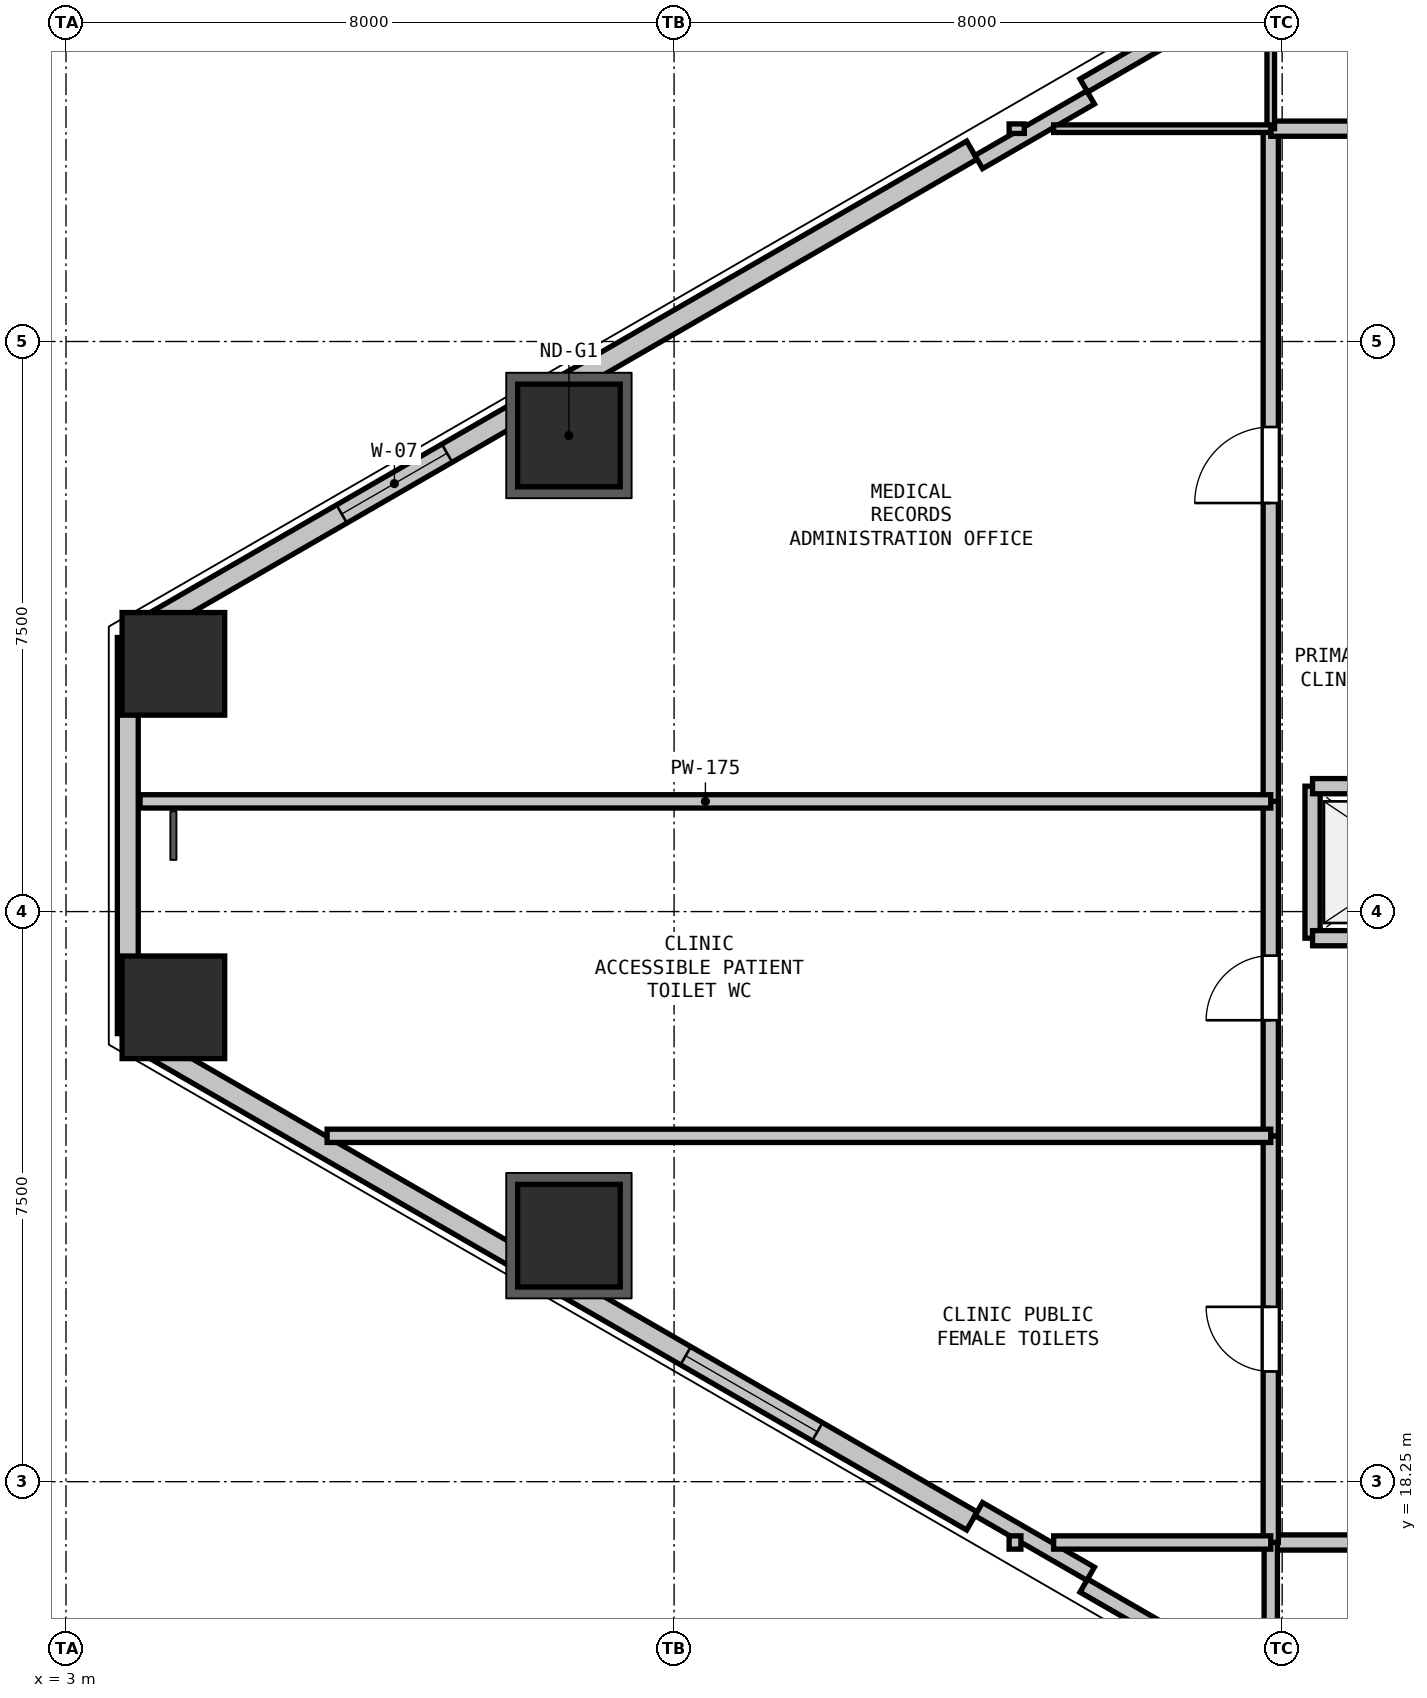
"""IFC4 building model, lengths in metres.
Left out: names, types, materials, properties, quantities, classifications, styles, units other than length and angle.
Written with IfcOpenShell. Run it as: python <this file> out.ifc"""

import sys

from ifc_helpers import new_model, si_unit, direction, frame, frame_2d, origin, origin_2d, place, context, subcontext, project, spatial, rectangle, hollow_rectangle, extrude, element, fill, save


model = new_model("IFC4")
c1 = context("Model", 3, precision=1e-05, world=origin(), true_north=direction((0.0, 1.0)))
c2 = subcontext(c1, "Body", "Model", "MODEL_VIEW")
j1 = project(units=[si_unit("LENGTHUNIT", "METRE"), si_unit("PLANEANGLEUNIT", "RADIAN")], contexts=[c1])
p1 = place(None, origin())
s1 = spatial("IfcSite", under=j1, at=p1, CompositionType="ELEMENT")
p2 = place(p1, origin())
s2 = spatial("IfcBuilding", under=s1, at=p2, CompositionType="ELEMENT")
p3 = place(p2, frame((0.0, 0.0, 9.6)))
s3 = spatial("IfcBuildingStorey", under=s2, at=p3, CompositionType="ELEMENT", Elevation=9.6)
for number, where, z_axis, x_axis in (
    (1, (4.413, 29.009, -0.32), (0.0, 0.0, 1.0), (1.0, 0.0, 0.0)),
    (2, (9.617, 32.014, -0.32), (0.0, 0.0, 1.0), (1.0, 0.0, 0.0)),
    (3, (9.617, 21.486, -0.32), (0.0, 0.0, 1.0), (1.0, 0.0, 0.0)),
    (4, (4.413, 24.491, -0.32), (0.0, 0.0, 1.0), (1.0, 0.0, 0.0)),
):
    element("IfcColumn", number, at=place(p3, frame(where, z_axis=z_axis, x_axis=x_axis)), inside=s3, PredefinedType="COLUMN", context=c2, shape_type="SweptSolid", body=[
        extrude(hollow_rectangle(XDim=1.35, YDim=1.35, WallThickness=0.036, at=origin_2d()), origin(), (0.0, 0.0, 1.0), 5.12),
    ])
p4 = place(p3, frame((3.813, 24.144, 0.0), z_axis=(0.0, 0.0, 1.0), x_axis=(0.0, 1.0, 0.0)))
e5 = element("IfcWall", 5, at=p4, inside=s3, PredefinedType="SOLIDWALL", context=c2, shape_type="SweptSolid", body=[
    extrude(rectangle(XDim=5.211, YDim=0.275, at=frame_2d((2.606, 0.0))), origin(), (0.0, 0.0, 1.0), 4.1),
])
p5 = place(p3, frame((3.943, 29.431, 0.0), z_axis=(0.0, 0.0, 1.0), x_axis=(0.866027105532, 0.499997052475, 0.0)))
e6 = element("IfcWall", 6, at=p5, inside=s3, PredefinedType="SOLIDWALL", context=c2, shape_type="SweptSolid", body=[
    extrude(rectangle(XDim=12.673, YDim=0.275, at=frame_2d((6.336, 0.0))), origin(), (0.0, 0.0, 1.0), 4.1),
])
p6 = place(p5, frame((3.1, 0.0, 0.9)))
e7 = element("IfcOpeningElement", 7, at=p6, cuts=e6, PredefinedType="OPENING", context=c2, shape_type="SweptSolid", body=[
    extrude(rectangle(XDim=1.6, YDim=1.8, at=frame_2d((0.8, 0.9))), frame((0.0, 0.147, 0.0), z_axis=(0.0, -1.0, 0.0), x_axis=(1.0, 0.0, 0.0)), (0.0, 0.0, 1.0), 0.295),
])
p7 = place(p3, frame((16.39, 36.617, 0.0), z_axis=(0.0, 0.0, 1.0), x_axis=(0.866027351828, 0.499996625875, 0.0)))
e8 = element("IfcWall", 8, at=p7, inside=s3, PredefinedType="PARAPET", context=c2, shape_type="SweptSolid", body=[
    extrude(rectangle(XDim=11.973, YDim=0.2, at=frame_2d((5.987, 0.0))), origin(), (0.0, 0.0, 1.0), 0.2),
])
p8 = place(p3, frame((15.008, 35.611, 0.0), z_axis=(0.0, 0.0, 1.0), x_axis=(0.86605165483, 0.499954529098, 0.0)))
e9 = element("IfcWall", 9, at=p8, inside=s3, PredefinedType="PARAPET", context=c2, shape_type="SweptSolid", body=[
    extrude(rectangle(XDim=1.7, YDim=0.2, at=frame_2d((0.85, 0.0))), origin(), (0.0, 0.0, 1.0), 4.1),
])
p9 = place(p3, frame((26.76, 10.896, 0.0), z_axis=(0.0, 0.0, 1.0), x_axis=(-0.866027351828, 0.499996625875, 0.0)))
e10 = element("IfcWall", 10, at=p9, inside=s3, PredefinedType="PARAPET", context=c2, shape_type="SweptSolid", body=[
    extrude(rectangle(XDim=11.973, YDim=0.2, at=frame_2d((5.987, 0.0))), origin(), (0.0, 0.0, 1.0), 0.2),
])
p10 = place(p3, frame((14.918, 17.733, 0.0), z_axis=(0.0, 0.0, 1.0), x_axis=(-0.866027105532, 0.499997052475, 0.0)))
e11 = element("IfcWall", 11, at=p10, inside=s3, PredefinedType="SOLIDWALL", context=c2, shape_type="SweptSolid", body=[
    extrude(rectangle(XDim=12.673, YDim=0.275, at=frame_2d((6.336, 0.0))), origin(), (0.0, 0.0, 1.0), 4.1),
])
p11 = place(p10, frame((2.348, 0.0, 0.9)))
e12 = element("IfcOpeningElement", 12, at=p11, cuts=e11, PredefinedType="OPENING", context=c2, shape_type="SweptSolid", body=[
    extrude(rectangle(XDim=2.0, YDim=1.8, at=frame_2d((1.0, 0.9))), frame((0.0, 0.147, 0.0), z_axis=(0.0, -1.0, 0.0), x_axis=(1.0, 0.0, 0.0)), (0.0, 0.0, 1.0), 0.295),
])
p12 = place(p3, frame((16.48, 17.039, 0.0), z_axis=(0.0, 0.0, 1.0), x_axis=(-0.86605165483, 0.499954529098, 0.0)))
e13 = element("IfcWall", 13, at=p12, inside=s3, PredefinedType="PARAPET", context=c2, shape_type="SweptSolid", body=[
    extrude(rectangle(XDim=1.7, YDim=0.2, at=frame_2d((0.85, 0.0))), origin(), (0.0, 0.0, 1.0), 4.1),
])
p13 = place(p3, frame((19.4, 25.4, 0.0), z_axis=(0.0, 0.0, 1.0), x_axis=(0.0, 1.0, 0.0)))
e14 = element("IfcWall", 14, at=p13, inside=s3, PredefinedType="PARTITIONING", context=c2, shape_type="SweptSolid", body=[
    extrude(rectangle(XDim=2.0, YDim=0.2, at=frame_2d((1.0, 0.0))), origin(), (0.0, 0.0, 1.0), 4.48),
])
p14 = place(p3, frame((19.4, 27.4, 0.0), z_axis=(0.0, 0.0, 1.0), x_axis=(1.0, 0.0, 0.0)))
e15 = element("IfcWall", 15, at=p14, inside=s3, PredefinedType="PARTITIONING", context=c2, shape_type="SweptSolid", body=[
    extrude(rectangle(XDim=2.8, YDim=0.2, at=frame_2d((1.4, 0.0))), origin(), (0.0, 0.0, 1.0), 3.928),
])
p15 = place(p3, frame((22.2, 25.4, 0.0), z_axis=(0.0, 0.0, 1.0), x_axis=(-1.0, 0.0, 0.0)))
e16 = element("IfcWall", 16, at=p15, inside=s3, PredefinedType="PARTITIONING", context=c2, shape_type="SweptSolid", body=[
    extrude(rectangle(XDim=2.8, YDim=0.2, at=frame_2d((1.4, 0.0))), origin(), (0.0, 0.0, 1.0), 3.928),
])
p16 = place(p15, frame((0.85, 0.0, 0.0)))
e17 = element("IfcOpeningElement", 17, at=p16, cuts=e16, PredefinedType="OPENING", context=c2, shape_type="SweptSolid", body=[
    extrude(rectangle(XDim=1.3, YDim=2.2, at=frame_2d((0.65, 1.1))), frame((0.0, 0.11, 0.0), z_axis=(0.0, -1.0, 0.0), x_axis=(1.0, 0.0, 0.0)), (0.0, 0.0, 1.0), 0.22),
])
p17 = place(p3, frame((23.8, 17.45, 0.0), z_axis=(0.0, 0.0, 1.0), x_axis=(-1.0, 0.0, 0.0)))
e18 = element("IfcWall", 18, at=p17, inside=s3, PredefinedType="PARTITIONING", context=c2, shape_type="SweptSolid", body=[
    extrude(rectangle(XDim=4.95, YDim=0.2, at=frame_2d((2.475, 0.0))), origin(), (0.0, 0.0, 1.0), 4.48),
])
p18 = place(p17, frame((2.05, 0.0, 0.0)))
e19 = element("IfcOpeningElement", 19, at=p18, cuts=e18, PredefinedType="OPENING", context=c2, shape_type="SweptSolid", body=[
    extrude(rectangle(XDim=0.85, YDim=2.1, at=frame_2d((0.425, 1.05))), frame((0.0, 0.11, 0.0), z_axis=(0.0, -1.0, 0.0), x_axis=(1.0, 0.0, 0.0)), (0.0, 0.0, 1.0), 0.22),
])
p19 = place(p3, frame((18.85, 17.45, 0.0), z_axis=(0.0, 0.0, 1.0), x_axis=(0.0, 1.0, 0.0)))
e20 = element("IfcWall", 20, at=p19, inside=s3, PredefinedType="PARTITIONING", context=c2, shape_type="SweptSolid", body=[
    extrude(rectangle(XDim=5.35, YDim=0.2, at=frame_2d((2.675, 0.0))), origin(), (0.0, 0.0, 1.0), 3.777),
])
p20 = place(p19, frame((2.25, 0.0, 0.0)))
e21 = element("IfcOpeningElement", 21, at=p20, cuts=e20, PredefinedType="OPENING", context=c2, shape_type="SweptSolid", body=[
    extrude(rectangle(XDim=0.85, YDim=2.1, at=frame_2d((0.425, 1.05))), frame((0.0, 0.11, 0.0), z_axis=(0.0, -1.0, 0.0), x_axis=(1.0, 0.0, 0.0)), (0.0, 0.0, 1.0), 0.22),
])
p21 = place(p3, frame((18.85, 22.8, 0.0), z_axis=(0.0, 0.0, 1.0), x_axis=(0.0, 1.0, 0.0)))
e22 = element("IfcWall", 22, at=p21, inside=s3, PredefinedType="PARTITIONING", context=c2, shape_type="SweptSolid", body=[
    extrude(rectangle(XDim=4.4, YDim=0.2, at=frame_2d((2.2, 0.0))), origin(), (0.0, 0.0, 1.0), 4.48),
])
p22 = place(p21, frame((1.521, 0.0, 0.0)))
e23 = element("IfcOpeningElement", 23, at=p22, cuts=e22, PredefinedType="OPENING", context=c2, shape_type="SweptSolid", body=[
    extrude(rectangle(XDim=0.85, YDim=2.1, at=frame_2d((0.425, 1.05))), frame((0.0, 0.11, 0.0), z_axis=(0.0, -1.0, 0.0), x_axis=(1.0, 0.0, 0.0)), (0.0, 0.0, 1.0), 0.22),
])
p23 = place(p3, frame((18.85, 27.2, 0.0), z_axis=(0.0, 0.0, 1.0), x_axis=(0.0, 1.0, 0.0)))
e24 = element("IfcWall", 24, at=p23, inside=s3, PredefinedType="PARTITIONING", context=c2, shape_type="SweptSolid", body=[
    extrude(rectangle(XDim=8.85, YDim=0.2, at=frame_2d((4.425, 0.0))), origin(), (0.0, 0.0, 1.0), 3.777),
])
p24 = place(p23, frame((3.925, 0.0, 0.0)))
e25 = element("IfcOpeningElement", 25, at=p24, cuts=e24, PredefinedType="OPENING", context=c2, shape_type="SweptSolid", body=[
    extrude(rectangle(XDim=1.0, YDim=2.15, at=frame_2d((0.5, 1.075))), frame((0.0, 0.11, 0.0), z_axis=(0.0, -1.0, 0.0), x_axis=(1.0, 0.0, 0.0)), (0.0, 0.0, 1.0), 0.22),
])
p25 = place(p3, frame((18.85, 36.05, 0.0), z_axis=(0.0, 0.0, 1.0), x_axis=(1.0, 0.0, 0.0)))
e26 = element("IfcWall", 26, at=p25, inside=s3, PredefinedType="PARTITIONING", context=c2, shape_type="SweptSolid", body=[
    extrude(rectangle(XDim=6.65, YDim=0.2, at=frame_2d((3.325, 0.0))), origin(), (0.0, 0.0, 1.0), 4.48),
])
p26 = place(p25, frame((2.525, 0.0, 0.0)))
e27 = element("IfcOpeningElement", 27, at=p26, cuts=e26, PredefinedType="OPENING", context=c2, shape_type="SweptSolid", body=[
    extrude(rectangle(XDim=1.6, YDim=2.2, at=frame_2d((0.8, 1.1))), frame((0.0, 0.11, 0.0), z_axis=(0.0, -1.0, 0.0), x_axis=(1.0, 0.0, 0.0)), (0.0, 0.0, 1.0), 0.22),
])
p27 = place(p3, frame((18.85, 15.509, 0.0), z_axis=(0.0, 0.0, 1.0), x_axis=(0.0, 1.0, 0.0)))
e28 = element("IfcWall", 28, at=p27, inside=s3, PredefinedType="PLUMBINGWALL", context=c2, shape_type="SweptSolid", body=[
    extrude(rectangle(XDim=1.941, YDim=0.175, at=frame_2d((0.97, 0.0))), origin(), (0.0, 0.0, 1.0), 4.09),
])
p28 = place(p3, frame((18.85, 17.45, 0.0), z_axis=(0.0, 0.0, 1.0), x_axis=(-1.0, 0.0, 0.0)))
e29 = element("IfcWall", 29, at=p28, inside=s3, PredefinedType="PLUMBINGWALL", context=c2, shape_type="SweptSolid", body=[
    extrude(rectangle(XDim=2.857, YDim=0.175, at=frame_2d((1.428, 0.0))), origin(), (0.0, 0.0, 1.0), 4.09),
])
p29 = place(p3, frame((15.563, 17.45, 0.0), z_axis=(0.0, 0.0, 1.0), x_axis=(-1.0, 0.0, 0.0)))
e30 = element("IfcWall", 30, at=p29, inside=s3, PredefinedType="PLUMBINGWALL", context=c2, shape_type="SweptSolid", body=[
    extrude(rectangle(XDim=0.155, YDim=0.175, at=frame_2d((0.078, 0.0))), origin(), (0.0, 0.0, 1.0), 4.48),
])
p30 = place(p3, frame((6.435, 22.8, 0.0), z_axis=(0.0, 0.0, 1.0), x_axis=(1.0, 0.0, 0.0)))
e31 = element("IfcWall", 31, at=p30, inside=s3, PredefinedType="PLUMBINGWALL", context=c2, shape_type="SweptSolid", body=[
    extrude(rectangle(XDim=12.415, YDim=0.175, at=frame_2d((6.208, 0.0))), origin(), (0.0, 0.0, 1.0), 3.777),
])
p31 = place(p3, frame((3.975, 27.2, 0.0), z_axis=(0.0, 0.0, 1.0), x_axis=(1.0, 0.0, 0.0)))
e32 = element("IfcWall", 32, at=p31, inside=s3, PredefinedType="PLUMBINGWALL", context=c2, shape_type="SweptSolid", body=[
    extrude(rectangle(XDim=14.875, YDim=0.175, at=frame_2d((7.438, 0.0))), origin(), (0.0, 0.0, 1.0), 4.09),
])
p32 = place(p3, frame((18.85, 36.05, 0.0), z_axis=(0.0, 0.0, 1.0), x_axis=(0.0, 1.0, 0.0)))
e33 = element("IfcWall", 33, at=p32, inside=s3, PredefinedType="PARTITIONING", context=c2, shape_type="SweptSolid", body=[
    extrude(rectangle(XDim=1.941, YDim=0.1, at=frame_2d((0.97, 0.0))), origin(), (0.0, 0.0, 1.0), 4.09),
])
p33 = place(p3, frame((15.408, 36.05, 0.0), z_axis=(0.0, 0.0, 1.0), x_axis=(1.0, 0.0, 0.0)))
e34 = element("IfcWall", 34, at=p33, inside=s3, PredefinedType="PARTITIONING", context=c2, shape_type="SweptSolid", body=[
    extrude(rectangle(XDim=0.2, YDim=0.125, at=frame_2d((0.1, 0.0))), origin(), (0.0, 0.0, 1.0), 4.48),
])
p34 = place(p3, frame((15.993, 36.05, 0.0), z_axis=(0.0, 0.0, 1.0), x_axis=(1.0, 0.0, 0.0)))
e35 = element("IfcWall", 35, at=p34, inside=s3, PredefinedType="PARTITIONING", context=c2, shape_type="SweptSolid", body=[
    extrude(rectangle(XDim=2.857, YDim=0.1, at=frame_2d((1.428, 0.0))), origin(), (0.0, 0.0, 1.0), 4.09),
])
p35 = place(p3, frame((3.813, 29.356, 0.0), z_axis=(0.0, 0.0, 1.0), x_axis=(0.866131372301, 0.499816412211, 0.0)))
e36 = element("IfcWall", 36, at=p35, inside=s3, PredefinedType="PARTITIONING", context=c2, shape_type="SweptSolid", body=[
    extrude(rectangle(XDim=0.15, YDim=0.125, at=frame_2d((0.075, 0.0))), origin(), (0.0, 0.0, 1.0), 4.48),
])
p36 = place(p6, origin())
e37 = element("IfcWindow", 37, at=p36, inside=s3, PartitioningType="SINGLE_PANEL", PredefinedType="WINDOW", context=c2, shape_type="SweptSolid", body=[
    extrude(rectangle(XDim=1.6, YDim=1.8, at=frame_2d((0.8, 0.9))), frame((0.0, 0.03, 0.0), z_axis=(0.0, -1.0, 0.0), x_axis=(1.0, 0.0, 0.0)), (0.0, 0.0, 1.0), 0.06),
])
fill(e7, e37)
p37 = place(p11, origin())
e38 = element("IfcWindow", 38, at=p37, inside=s3, PartitioningType="SINGLE_PANEL", PredefinedType="WINDOW", context=c2, shape_type="SweptSolid", body=[
    extrude(rectangle(XDim=2.0, YDim=1.8, at=frame_2d((1.0, 0.9))), frame((0.0, 0.03, 0.0), z_axis=(0.0, -1.0, 0.0), x_axis=(1.0, 0.0, 0.0)), (0.0, 0.0, 1.0), 0.06),
])
fill(e12, e38)
p38 = place(p20, origin())
e39 = element("IfcDoor", 39, at=p38, inside=s3, OperationType="SINGLE_SWING_RIGHT", PredefinedType="DOOR", context=c2, shape_type="SweptSolid", body=[
    extrude(rectangle(XDim=0.85, YDim=2.1, at=frame_2d((0.425, 1.05))), frame((0.0, 0.025, 0.0), z_axis=(0.0, -1.0, 0.0), x_axis=(1.0, 0.0, 0.0)), (0.0, 0.0, 1.0), 0.05),
])
fill(e21, e39)
p39 = place(p22, origin())
e40 = element("IfcDoor", 40, at=p39, inside=s3, OperationType="SINGLE_SWING_LEFT", PredefinedType="DOOR", context=c2, shape_type="SweptSolid", body=[
    extrude(rectangle(XDim=0.85, YDim=2.1, at=frame_2d((0.425, 1.05))), frame((0.0, 0.025, 0.0), z_axis=(0.0, -1.0, 0.0), x_axis=(1.0, 0.0, 0.0)), (0.0, 0.0, 1.0), 0.05),
])
fill(e23, e40)
p40 = place(p24, origin())
e41 = element("IfcDoor", 41, at=p40, inside=s3, OperationType="SINGLE_SWING_LEFT", PredefinedType="DOOR", context=c2, shape_type="SweptSolid", body=[
    extrude(rectangle(XDim=1.0, YDim=2.15, at=frame_2d((0.5, 1.075))), frame((0.0, 0.025, 0.0), z_axis=(0.0, -1.0, 0.0), x_axis=(1.0, 0.0, 0.0)), (0.0, 0.0, 1.0), 0.05),
])
fill(e25, e41)
save(model, sys.argv[1])
